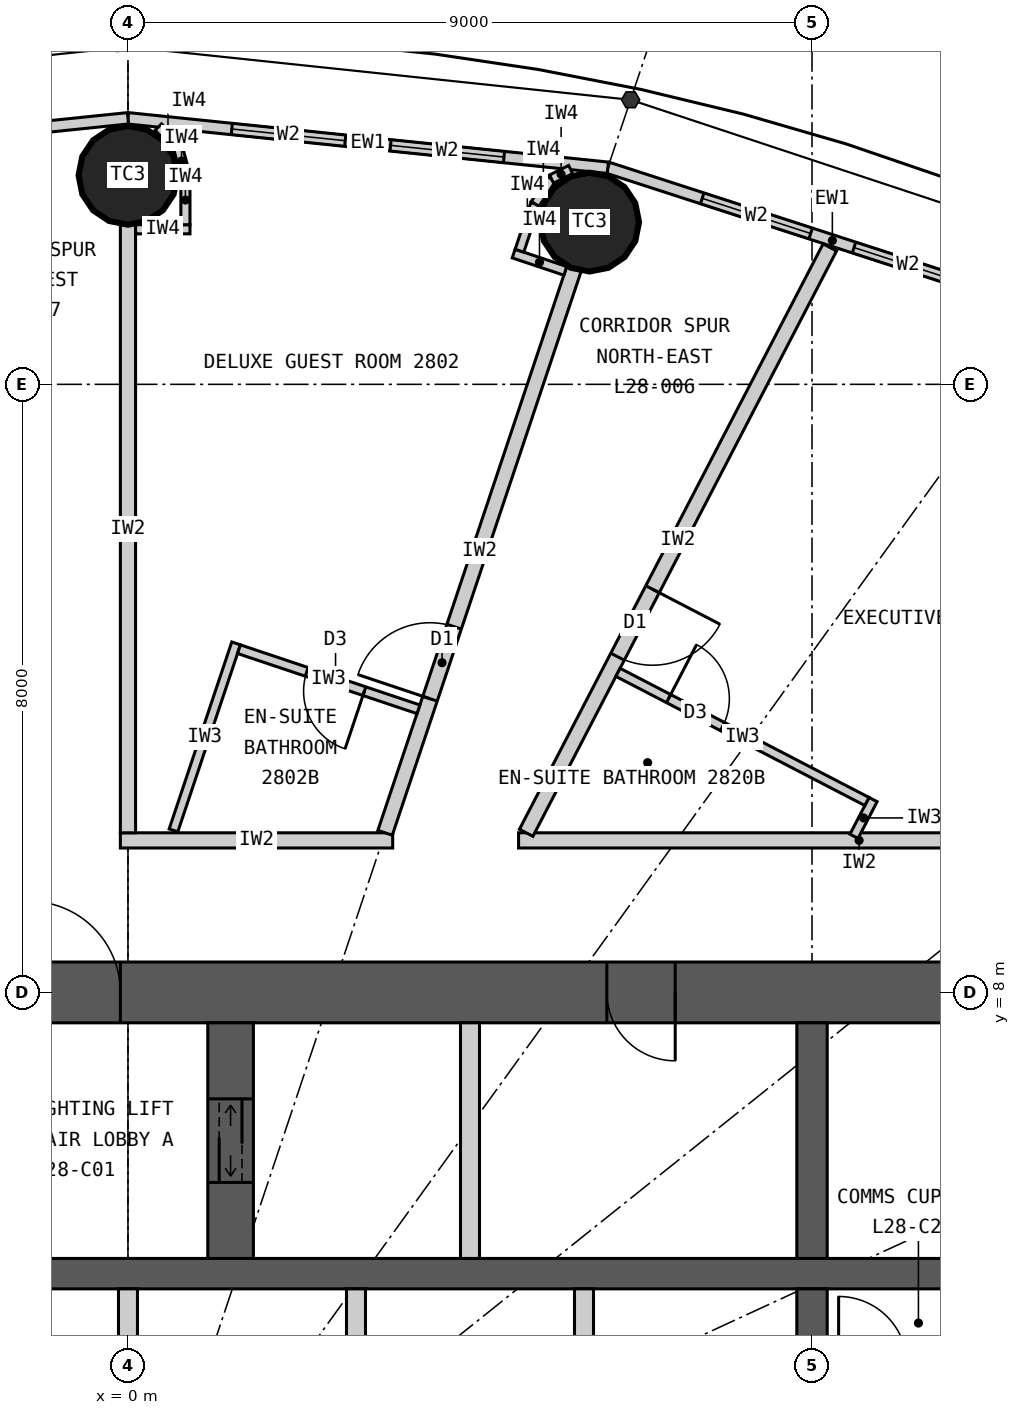
"""IFC4 building model, lengths in metres.
Left out: names, types, materials, properties, quantities, classifications, styles, units other than length and angle.
Written with IfcOpenShell. Run it as: python <this file> out.ifc"""

import sys

from ifc_helpers import new_model, si_unit, direction, frame, frame_2d, origin, origin_2d, place, context, subcontext, project, spatial, rectangle, circle, extrude, element, fill, save


model = new_model("IFC4")
c1 = context("Model", 3, precision=1e-05, world=origin(), true_north=direction((0.0, 1.0)))
c2 = subcontext(c1, "Body", "Model", "MODEL_VIEW")
j1 = project(units=[si_unit("LENGTHUNIT", "METRE"), si_unit("PLANEANGLEUNIT", "RADIAN")], contexts=[c1])
p1 = place(None, origin())
s1 = spatial("IfcSite", under=j1, at=p1, CompositionType="ELEMENT")
p2 = place(p1, origin())
s2 = spatial("IfcBuilding", under=s1, at=p2, CompositionType="ELEMENT")
p3 = place(p2, frame((0.0, 0.0, 112.2)))
s3 = spatial("IfcBuildingStorey", under=s2, at=p3, CompositionType="ELEMENT", Elevation=112.2)
for number, where, z_axis, x_axis in (
    (1, (6.074, 18.135, 0.0), (0.0, 0.0, 1.0), (1.0, 0.0, 0.0)),
    (2, (0.0, 18.75, 0.0), (0.0, 0.0, 1.0), (1.0, 0.0, 0.0)),
):
    element("IfcColumn", number, at=place(p3, frame(where, z_axis=z_axis, x_axis=x_axis)), inside=s3, PredefinedType="COLUMN", context=c2, shape_type="SweptSolid", body=[
        extrude(circle(Radius=0.65, at=origin_2d()), origin(), (0.0, 0.0, 1.0), 3.3),
    ])
p4 = place(p3, frame((-12.4, 8.0, 0.0), z_axis=(0.0, 0.0, 1.0), x_axis=(1.0, 0.0, 0.0)))
e3 = element("IfcWall", 3, at=p4, inside=s3, PredefinedType="SHEAR", context=c2, shape_type="SweptSolid", body=[
    extrude(rectangle(XDim=24.8, YDim=0.8, at=frame_2d((12.4, 0.0))), origin(), (0.0, 0.0, 1.0), 3.3),
])
p5 = place(p4, frame((11.1, 0.0, 0.0)))
e4 = element("IfcOpeningElement", 4, at=p5, cuts=e3, PredefinedType="OPENING", context=c2, shape_type="SweptSolid", body=[
    extrude(rectangle(XDim=1.2, YDim=2.2, at=frame_2d((0.6, 1.1))), frame((0.0, 0.41, 0.0), z_axis=(0.0, -1.0, 0.0), x_axis=(1.0, 0.0, 0.0)), (0.0, 0.0, 1.0), 0.82),
])
p6 = place(p4, frame((18.7, 0.0, 0.0)))
e5 = element("IfcOpeningElement", 5, at=p6, cuts=e3, PredefinedType="OPENING", context=c2, shape_type="SweptSolid", body=[
    extrude(rectangle(XDim=0.9, YDim=2.2, at=frame_2d((0.45, 1.1))), frame((0.0, 0.41, 0.0), z_axis=(0.0, -1.0, 0.0), x_axis=(1.0, 0.0, 0.0)), (0.0, 0.0, 1.0), 0.82),
])
p7 = place(p3, frame((-11.6, 4.3, 0.0), z_axis=(0.0, 0.0, 1.0), x_axis=(1.0, 0.0, 0.0)))
e6 = element("IfcWall", 6, at=p7, inside=s3, PredefinedType="SHEAR", context=c2, shape_type="SweptSolid", body=[
    extrude(rectangle(XDim=23.2, YDim=0.4, at=frame_2d((11.6, 0.0))), origin(), (0.0, 0.0, 1.0), 3.3),
])
p8 = place(p3, frame((9.0, 4.5, 0.0), z_axis=(0.0, 0.0, 1.0), x_axis=(0.0, 1.0, 0.0)))
e7 = element("IfcWall", 7, at=p8, inside=s3, PredefinedType="SHEAR", context=c2, shape_type="SweptSolid", body=[
    extrude(rectangle(XDim=3.1, YDim=0.4, at=frame_2d((1.55, 0.0))), origin(), (0.0, 0.0, 1.0), 3.3),
])
p9 = place(p3, frame((9.0, 1.75, 0.0), z_axis=(0.0, 0.0, 1.0), x_axis=(0.0, 1.0, 0.0)))
e8 = element("IfcWall", 8, at=p9, inside=s3, PredefinedType="SHEAR", context=c2, shape_type="SweptSolid", body=[
    extrude(rectangle(XDim=2.35, YDim=0.4, at=frame_2d((1.175, 0.0))), origin(), (0.0, 0.0, 1.0), 3.3),
])
p10 = place(p3, frame((1.35, 4.5, 0.0), z_axis=(0.0, 0.0, 1.0), x_axis=(0.0, 1.0, 0.0)))
e9 = element("IfcWall", 9, at=p10, inside=s3, PredefinedType="SHEAR", context=c2, shape_type="SweptSolid", body=[
    extrude(rectangle(XDim=3.1, YDim=0.6, at=frame_2d((1.55, 0.0))), origin(), (0.0, 0.0, 1.0), 3.3),
])
p11 = place(p10, frame((1.0, 0.0, 0.0)))
e10 = element("IfcOpeningElement", 10, at=p11, cuts=e9, PredefinedType="OPENING", context=c2, shape_type="SweptSolid", body=[
    extrude(rectangle(XDim=1.1, YDim=2.2, at=frame_2d((0.55, 1.1))), frame((0.0, 0.31, 0.0), z_axis=(0.0, -1.0, 0.0), x_axis=(1.0, 0.0, 0.0)), (0.0, 0.0, 1.0), 0.62),
])
p12 = place(p3, frame((4.5, 4.5, 0.0), z_axis=(0.0, 0.0, 1.0), x_axis=(0.0, 1.0, 0.0)))
e11 = element("IfcWall", 11, at=p12, inside=s3, PredefinedType="PARTITIONING", context=c2, shape_type="SweptSolid", body=[
    extrude(rectangle(XDim=3.1, YDim=0.25, at=frame_2d((1.55, 0.0))), origin(), (0.0, 0.0, 1.0), 3.3),
])
for number, where, z_axis, x_axis in (
    (12, (0.0, 1.75, 0.0), (0.0, 0.0, 1.0), (0.0, 1.0, 0.0)),
    (13, (3.0, 1.75, 0.0), (0.0, 0.0, 1.0), (0.0, 1.0, 0.0)),
    (14, (6.0, 1.75, 0.0), (0.0, 0.0, 1.0), (0.0, 1.0, 0.0)),
):
    element("IfcWall", number, at=place(p3, frame(where, z_axis=z_axis, x_axis=x_axis)), inside=s3, PredefinedType="PARTITIONING", context=c2, shape_type="SweptSolid", body=[
        extrude(rectangle(XDim=2.35, YDim=0.25, at=frame_2d((1.175, 0.0))), origin(), (0.0, 0.0, 1.0), 3.3),
    ])
p13 = place(p3, frame((12.221, 16.935, 0.0), z_axis=(0.0, 0.0, 1.0), x_axis=(-0.951272691506, 0.308350881944, 0.0)))
e15 = element("IfcWall", 15, at=p13, inside=s3, PredefinedType="ELEMENTEDWALL", context=c2, shape_type="SweptSolid", body=[
    extrude(rectangle(XDim=6.211, YDim=0.15, at=frame_2d((3.105, 0.0))), origin(), (0.0, 0.0, 1.0), 3.12),
])
p14 = place(p13, frame((1.305, 0.0, 0.9)))
e16 = element("IfcOpeningElement", 16, at=p14, cuts=e15, PredefinedType="OPENING", context=c2, shape_type="SweptSolid", body=[
    extrude(rectangle(XDim=1.5, YDim=1.9, at=frame_2d((0.75, 0.95))), frame((0.0, 0.085, 0.0), z_axis=(0.0, -1.0, 0.0), x_axis=(1.0, 0.0, 0.0)), (0.0, 0.0, 1.0), 0.17),
])
p15 = place(p13, frame((3.405, 0.0, 0.9)))
e17 = element("IfcOpeningElement", 17, at=p15, cuts=e15, PredefinedType="OPENING", context=c2, shape_type="SweptSolid", body=[
    extrude(rectangle(XDim=1.5, YDim=1.9, at=frame_2d((0.75, 0.95))), frame((0.0, 0.085, 0.0), z_axis=(0.0, -1.0, 0.0), x_axis=(1.0, 0.0, 0.0)), (0.0, 0.0, 1.0), 0.17),
])
p16 = place(p3, frame((6.313, 18.85, 0.0), z_axis=(0.0, 0.0, 1.0), x_axis=(-0.994735690163, 0.102473931887, 0.0)))
e18 = element("IfcWall", 18, at=p16, inside=s3, PredefinedType="ELEMENTEDWALL", context=c2, shape_type="SweptSolid", body=[
    extrude(rectangle(XDim=6.347, YDim=0.15, at=frame_2d((3.173, 0.0))), origin(), (0.0, 0.0, 1.0), 3.12),
])
p17 = place(p16, frame((1.373, 0.0, 0.9)))
e19 = element("IfcOpeningElement", 19, at=p17, cuts=e18, PredefinedType="OPENING", context=c2, shape_type="SweptSolid", body=[
    extrude(rectangle(XDim=1.5, YDim=1.9, at=frame_2d((0.75, 0.95))), frame((0.0, 0.085, 0.0), z_axis=(0.0, -1.0, 0.0), x_axis=(1.0, 0.0, 0.0)), (0.0, 0.0, 1.0), 0.17),
])
p18 = place(p16, frame((3.473, 0.0, 0.9)))
e20 = element("IfcOpeningElement", 20, at=p18, cuts=e18, PredefinedType="OPENING", context=c2, shape_type="SweptSolid", body=[
    extrude(rectangle(XDim=1.5, YDim=1.9, at=frame_2d((0.75, 0.95))), frame((0.0, 0.085, 0.0), z_axis=(0.0, -1.0, 0.0), x_axis=(1.0, 0.0, 0.0)), (0.0, 0.0, 1.0), 0.17),
])
p19 = place(p3, frame((0.0, 19.5, 0.0), z_axis=(0.0, 0.0, 1.0), x_axis=(-0.994735690163, -0.102473931887, 0.0)))
e21 = element("IfcWall", 21, at=p19, inside=s3, PredefinedType="ELEMENTEDWALL", context=c2, shape_type="SweptSolid", body=[
    extrude(rectangle(XDim=6.347, YDim=0.15, at=frame_2d((3.173, 0.0))), origin(), (0.0, 0.0, 1.0), 3.12),
])
p20 = place(p19, frame((1.373, 0.0, 0.9)))
e22 = element("IfcOpeningElement", 22, at=p20, cuts=e21, PredefinedType="OPENING", context=c2, shape_type="SweptSolid", body=[
    extrude(rectangle(XDim=1.5, YDim=1.9, at=frame_2d((0.75, 0.95))), frame((0.0, 0.085, 0.0), z_axis=(0.0, -1.0, 0.0), x_axis=(1.0, 0.0, 0.0)), (0.0, 0.0, 1.0), 0.17),
])
p21 = place(p19, frame((3.473, 0.0, 0.9)))
e23 = element("IfcOpeningElement", 23, at=p21, cuts=e21, PredefinedType="OPENING", context=c2, shape_type="SweptSolid", body=[
    extrude(rectangle(XDim=1.5, YDim=1.9, at=frame_2d((0.75, 0.95))), frame((0.0, 0.085, 0.0), z_axis=(0.0, -1.0, 0.0), x_axis=(1.0, 0.0, 0.0)), (0.0, 0.0, 1.0), 0.17),
])
p22 = place(p3, frame((-0.1, 10.0, 0.0), z_axis=(0.0, 0.0, 1.0), x_axis=(1.0, 0.0, 0.0)))
e24 = element("IfcWall", 24, at=p22, inside=s3, PredefinedType="PARTITIONING", context=c2, shape_type="SweptSolid", body=[
    extrude(rectangle(XDim=3.583, YDim=0.2, at=frame_2d((1.792, 0.0))), origin(), (0.0, 0.0, 1.0), 3.12),
])
p23 = place(p3, frame((5.139, 10.0, 0.0), z_axis=(0.0, 0.0, 1.0), x_axis=(1.0, 0.0, 0.0)))
e25 = element("IfcWall", 25, at=p23, inside=s3, PredefinedType="PARTITIONING", context=c2, shape_type="SweptSolid", body=[
    extrude(rectangle(XDim=8.961, YDim=0.2, at=frame_2d((4.48, 0.0))), origin(), (0.0, 0.0, 1.0), 3.12),
])
p24 = place(p3, frame((5.239, 10.1, 0.0), z_axis=(0.0, 0.0, 1.0), x_axis=(0.4604797896, 0.887670188398, 0.0)))
e26 = element("IfcWall", 26, at=p24, inside=s3, PredefinedType="PARTITIONING", context=c2, shape_type="SweptSolid", body=[
    extrude(rectangle(XDim=8.676, YDim=0.2, at=frame_2d((4.338, 0.0))), origin(), (0.0, 0.0, 1.0), 3.12),
])
p25 = place(p24, frame((2.61, 0.0, 0.0)))
e27 = element("IfcOpeningElement", 27, at=p25, cuts=e26, PredefinedType="OPENING", context=c2, shape_type="SweptSolid", body=[
    extrude(rectangle(XDim=1.0, YDim=2.2, at=frame_2d((0.5, 1.1))), frame((0.0, 0.11, 0.0), z_axis=(0.0, -1.0, 0.0), x_axis=(1.0, 0.0, 0.0)), (0.0, 0.0, 1.0), 0.22),
])
p26 = place(p3, frame((3.383, 10.1, 0.0), z_axis=(0.0, 0.0, 1.0), x_axis=(0.317603705574, 0.948223542318, 0.0)))
e28 = element("IfcWall", 28, at=p26, inside=s3, PredefinedType="PARTITIONING", context=c2, shape_type="SweptSolid", body=[
    extrude(rectangle(XDim=7.823, YDim=0.2, at=frame_2d((3.912, 0.0))), origin(), (0.0, 0.0, 1.0), 2.37),
])
p27 = place(p26, frame((1.86, 0.0, 0.0)))
e29 = element("IfcOpeningElement", 29, at=p27, cuts=e28, PredefinedType="OPENING", context=c2, shape_type="SweptSolid", body=[
    extrude(rectangle(XDim=1.0, YDim=2.2, at=frame_2d((0.5, 1.1))), frame((0.0, 0.11, 0.0), z_axis=(0.0, -1.0, 0.0), x_axis=(1.0, 0.0, 0.0)), (0.0, 0.0, 1.0), 0.22),
])
p28 = place(p3, frame((0.0, 10.1, 0.0), z_axis=(0.0, 0.0, 1.0), x_axis=(0.0, 1.0, 0.0)))
e30 = element("IfcWall", 30, at=p28, inside=s3, PredefinedType="PARTITIONING", context=c2, shape_type="SweptSolid", body=[
    extrude(rectangle(XDim=8.0, YDim=0.2, at=frame_2d((4.0, 0.0))), origin(), (0.0, 0.0, 1.0), 2.37),
])
p29 = place(p3, frame((0.599, 10.132, 0.0), z_axis=(0.0, 0.0, 1.0), x_axis=(0.317554522053, 0.948240014724, 0.0)))
e31 = element("IfcWall", 31, at=p29, inside=s3, PredefinedType="PARTITIONING", context=c2, shape_type="SweptSolid", body=[
    extrude(rectangle(XDim=2.594, YDim=0.12, at=frame_2d((1.297, 0.0))), origin(), (0.0, 0.0, 1.0), 3.12),
])
p30 = place(p3, frame((3.822, 11.725, 0.0), z_axis=(0.0, 0.0, 1.0), x_axis=(-0.948231307998, 0.317580519761, 0.0)))
e32 = element("IfcWall", 32, at=p30, inside=s3, PredefinedType="PARTITIONING", context=c2, shape_type="SweptSolid", body=[
    extrude(rectangle(XDim=2.49, YDim=0.12, at=frame_2d((1.245, 0.0))), origin(), (0.0, 0.0, 1.0), 3.12),
])
p31 = place(p30, frame((0.75, 0.0, 0.0)))
e33 = element("IfcOpeningElement", 33, at=p31, cuts=e32, PredefinedType="OPENING", context=c2, shape_type="SweptSolid", body=[
    extrude(rectangle(XDim=0.8, YDim=2.1, at=frame_2d((0.4, 1.05))), frame((0.0, 0.07, 0.0), z_axis=(0.0, -1.0, 0.0), x_axis=(1.0, 0.0, 0.0)), (0.0, 0.0, 1.0), 0.14),
])
p32 = place(p3, frame((9.552, 10.054, 0.0), z_axis=(0.0, 0.0, 1.0), x_axis=(0.460604866949, 0.887605293215, 0.0)))
e34 = element("IfcWall", 34, at=p32, inside=s3, PredefinedType="PARTITIONING", context=c2, shape_type="SweptSolid", body=[
    extrude(rectangle(XDim=0.545, YDim=0.12, at=frame_2d((0.272, 0.0))), origin(), (0.0, 0.0, 1.0), 3.12),
])
p33 = place(p3, frame((6.447, 12.211, 0.0), z_axis=(0.0, 0.0, 1.0), x_axis=(0.887685422499, -0.460450421525, 0.0)))
e35 = element("IfcWall", 35, at=p33, inside=s3, PredefinedType="PARTITIONING", context=c2, shape_type="SweptSolid", body=[
    extrude(rectangle(XDim=3.69, YDim=0.12, at=frame_2d((1.845, 0.0))), origin(), (0.0, 0.0, 1.0), 3.12),
])
p34 = place(p33, frame((0.75, 0.0, 0.0)))
e36 = element("IfcOpeningElement", 36, at=p34, cuts=e35, PredefinedType="OPENING", context=c2, shape_type="SweptSolid", body=[
    extrude(rectangle(XDim=0.8, YDim=2.1, at=frame_2d((0.4, 1.05))), frame((0.0, 0.07, 0.0), z_axis=(0.0, -1.0, 0.0), x_axis=(1.0, 0.0, 0.0)), (0.0, 0.0, 1.0), 0.14),
])
p35 = place(p3, frame((5.754, 17.493, 0.0), z_axis=(0.0, 0.0, 1.0), x_axis=(-0.9482389443, 0.317557718397, 0.0)))
e37 = element("IfcWall", 37, at=p35, inside=s3, PredefinedType="PARTITIONING", context=c2, shape_type="SweptSolid", body=[
    extrude(rectangle(XDim=0.716, YDim=0.12, at=frame_2d((0.358, 0.0))), origin(), (0.0, 0.0, 1.0), 3.12),
])
p36 = place(p3, frame((5.151, 17.758, 0.0), z_axis=(0.0, 0.0, 1.0), x_axis=(0.317354244456, 0.948307061835, 0.0)))
e38 = element("IfcWall", 38, at=p36, inside=s3, PredefinedType="PARTITIONING", context=c2, shape_type="SweptSolid", body=[
    extrude(rectangle(XDim=0.65, YDim=0.12, at=frame_2d((0.325, 0.0))), origin(), (0.0, 0.0, 1.0), 3.12),
])
p37 = place(p3, frame((5.357, 18.375, 0.0), z_axis=(0.0, 0.0, 1.0), x_axis=(0.552249752128, 0.833678721856, 0.0)))
e39 = element("IfcWall", 39, at=p37, inside=s3, PredefinedType="PARTITIONING", context=c2, shape_type="SweptSolid", body=[
    extrude(rectangle(XDim=0.391, YDim=0.12, at=frame_2d((0.196, 0.0))), origin(), (0.0, 0.0, 1.0), 3.12),
])
p38 = place(p3, frame((5.573, 18.701, 0.0), z_axis=(0.0, 0.0, 1.0), x_axis=(0.895295561985, 0.445472621707, 0.0)))
e40 = element("IfcWall", 40, at=p38, inside=s3, PredefinedType="PARTITIONING", context=c2, shape_type="SweptSolid", body=[
    extrude(rectangle(XDim=0.281, YDim=0.12, at=frame_2d((0.14, 0.0))), origin(), (0.0, 0.0, 1.0), 3.12),
])
p39 = place(p3, frame((0.1, 18.04, 0.0), z_axis=(0.0, 0.0, 1.0), x_axis=(1.0, 0.0, 0.0)))
e41 = element("IfcWall", 41, at=p39, inside=s3, PredefinedType="PARTITIONING", context=c2, shape_type="SweptSolid", body=[
    extrude(rectangle(XDim=0.716, YDim=0.12, at=frame_2d((0.358, 0.0))), origin(), (0.0, 0.0, 1.0), 3.12),
])
p40 = place(p3, frame((0.756, 18.1, 0.0), z_axis=(0.0, 0.0, 1.0), x_axis=(0.0, 1.0, 0.0)))
e42 = element("IfcWall", 42, at=p40, inside=s3, PredefinedType="PARTITIONING", context=c2, shape_type="SweptSolid", body=[
    extrude(rectangle(XDim=0.65, YDim=0.12, at=frame_2d((0.325, 0.0))), origin(), (0.0, 0.0, 1.0), 3.12),
])
p41 = place(p3, frame((0.756, 18.75, 0.0), z_axis=(0.0, 0.0, 1.0), x_axis=(-0.2589440045, 0.965892334856, 0.0)))
e43 = element("IfcWall", 43, at=p41, inside=s3, PredefinedType="PARTITIONING", context=c2, shape_type="SweptSolid", body=[
    extrude(rectangle(XDim=0.391, YDim=0.12, at=frame_2d((0.196, 0.0))), origin(), (0.0, 0.0, 1.0), 3.12),
])
p42 = place(p3, frame((0.655, 19.128, 0.0), z_axis=(0.0, 0.0, 1.0), x_axis=(-0.707443899976, 0.706769501596, 0.0)))
e44 = element("IfcWall", 44, at=p42, inside=s3, PredefinedType="PARTITIONING", context=c2, shape_type="SweptSolid", body=[
    extrude(rectangle(XDim=0.362, YDim=0.12, at=frame_2d((0.181, 0.0))), origin(), (0.0, 0.0, 1.0), 3.12),
])
p43 = place(p14, origin())
e45 = element("IfcWindow", 45, at=p43, inside=s3, PartitioningType="SINGLE_PANEL", PredefinedType="WINDOW", context=c2, shape_type="SweptSolid", body=[
    extrude(rectangle(XDim=1.5, YDim=1.9, at=frame_2d((0.75, 0.95))), frame((0.0, 0.03, 0.0), z_axis=(0.0, -1.0, 0.0), x_axis=(1.0, 0.0, 0.0)), (0.0, 0.0, 1.0), 0.06),
])
fill(e16, e45)
p44 = place(p15, origin())
e46 = element("IfcWindow", 46, at=p44, inside=s3, PartitioningType="SINGLE_PANEL", PredefinedType="WINDOW", context=c2, shape_type="SweptSolid", body=[
    extrude(rectangle(XDim=1.5, YDim=1.9, at=frame_2d((0.75, 0.95))), frame((0.0, 0.03, 0.0), z_axis=(0.0, -1.0, 0.0), x_axis=(1.0, 0.0, 0.0)), (0.0, 0.0, 1.0), 0.06),
])
fill(e17, e46)
p45 = place(p17, origin())
e47 = element("IfcWindow", 47, at=p45, inside=s3, PartitioningType="SINGLE_PANEL", PredefinedType="WINDOW", context=c2, shape_type="SweptSolid", body=[
    extrude(rectangle(XDim=1.5, YDim=1.9, at=frame_2d((0.75, 0.95))), frame((0.0, 0.03, 0.0), z_axis=(0.0, -1.0, 0.0), x_axis=(1.0, 0.0, 0.0)), (0.0, 0.0, 1.0), 0.06),
])
fill(e19, e47)
p46 = place(p18, origin())
e48 = element("IfcWindow", 48, at=p46, inside=s3, PartitioningType="SINGLE_PANEL", PredefinedType="WINDOW", context=c2, shape_type="SweptSolid", body=[
    extrude(rectangle(XDim=1.5, YDim=1.9, at=frame_2d((0.75, 0.95))), frame((0.0, 0.03, 0.0), z_axis=(0.0, -1.0, 0.0), x_axis=(1.0, 0.0, 0.0)), (0.0, 0.0, 1.0), 0.06),
])
fill(e20, e48)
p47 = place(p31, origin())
e49 = element("IfcDoor", 49, at=p47, inside=s3, OperationType="SINGLE_SWING_LEFT", PredefinedType="DOOR", context=c2, shape_type="SweptSolid", body=[
    extrude(rectangle(XDim=0.8, YDim=2.1, at=frame_2d((0.4, 1.05))), frame((0.0, 0.025, 0.0), z_axis=(0.0, -1.0, 0.0), x_axis=(1.0, 0.0, 0.0)), (0.0, 0.0, 1.0), 0.05),
])
fill(e33, e49)
p48 = place(p27, origin())
e50 = element("IfcDoor", 50, at=p48, inside=s3, OperationType="SINGLE_SWING_LEFT", PredefinedType="DOOR", context=c2, shape_type="SweptSolid", body=[
    extrude(rectangle(XDim=1.0, YDim=2.2, at=frame_2d((0.5, 1.1))), frame((0.0, 0.025, 0.0), z_axis=(0.0, -1.0, 0.0), x_axis=(1.0, 0.0, 0.0)), (0.0, 0.0, 1.0), 0.05),
])
fill(e29, e50)
p49 = place(p34, origin())
e51 = element("IfcDoor", 51, at=p49, inside=s3, OperationType="SINGLE_SWING_LEFT", PredefinedType="DOOR", context=c2, shape_type="SweptSolid", body=[
    extrude(rectangle(XDim=0.8, YDim=2.1, at=frame_2d((0.4, 1.05))), frame((0.0, 0.025, 0.0), z_axis=(0.0, -1.0, 0.0), x_axis=(1.0, 0.0, 0.0)), (0.0, 0.0, 1.0), 0.05),
])
fill(e36, e51)
p50 = place(p25, origin())
e52 = element("IfcDoor", 52, at=p50, inside=s3, OperationType="SINGLE_SWING_RIGHT", PredefinedType="DOOR", context=c2, shape_type="SweptSolid", body=[
    extrude(rectangle(XDim=1.0, YDim=2.2, at=frame_2d((0.5, 1.1))), frame((0.0, 0.025, 0.0), z_axis=(0.0, -1.0, 0.0), x_axis=(1.0, 0.0, 0.0)), (0.0, 0.0, 1.0), 0.05),
])
fill(e27, e52)
p51 = place(p5, origin())
e53 = element("IfcDoor", 53, at=p51, inside=s3, OperationType="SINGLE_SWING_LEFT", PredefinedType="DOOR", context=c2, shape_type="SweptSolid", body=[
    extrude(rectangle(XDim=1.2, YDim=2.2, at=frame_2d((0.6, 1.1))), frame((0.0, 0.025, 0.0), z_axis=(0.0, -1.0, 0.0), x_axis=(1.0, 0.0, 0.0)), (0.0, 0.0, 1.0), 0.05),
])
fill(e4, e53)
p52 = place(p11, origin())
e54 = element("IfcDoor", 54, at=p52, inside=s3, OperationType="DOUBLE_DOOR_SLIDING", PredefinedType="DOOR", context=c2, shape_type="SweptSolid", body=[
    extrude(rectangle(XDim=1.1, YDim=2.2, at=frame_2d((0.55, 1.1))), frame((0.0, 0.025, 0.0), z_axis=(0.0, -1.0, 0.0), x_axis=(1.0, 0.0, 0.0)), (0.0, 0.0, 1.0), 0.05),
])
fill(e10, e54)
p53 = place(p6, origin())
e55 = element("IfcDoor", 55, at=p53, inside=s3, OperationType="SINGLE_SWING_RIGHT", PredefinedType="DOOR", context=c2, shape_type="SweptSolid", body=[
    extrude(rectangle(XDim=0.9, YDim=2.2, at=frame_2d((0.45, 1.1))), frame((0.0, 0.025, 0.0), z_axis=(0.0, -1.0, 0.0), x_axis=(1.0, 0.0, 0.0)), (0.0, 0.0, 1.0), 0.05),
])
fill(e5, e55)
save(model, sys.argv[1])
